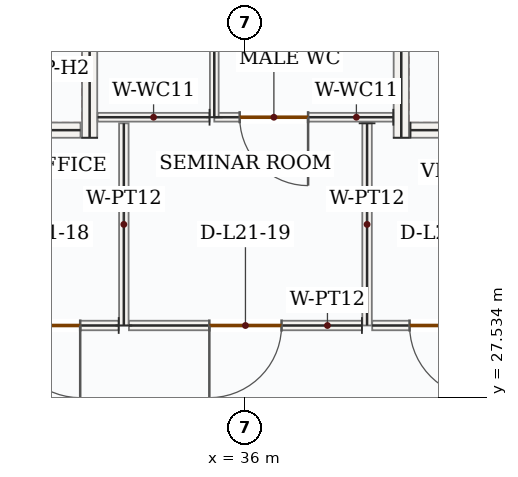
"""IFC4 building model, lengths in metres.
Left out: names, types, materials, properties, quantities, classifications, styles, units other than length and angle.
Written with IfcOpenShell. Run it as: python <this file> out.ifc"""

import sys

from ifc_helpers import new_model, si_unit, direction, frame, frame_2d, origin, place, context, subcontext, project, spatial, rectangle, extrude, source, transform, mapped, element, fill, save


model = new_model("IFC4")
c1 = context("Model", 3, precision=1e-05, world=origin(), true_north=direction((0.0, 1.0)))
c2 = subcontext(c1, "Body", "Model", "MODEL_VIEW")
j1 = project(units=[si_unit("LENGTHUNIT", "METRE"), si_unit("PLANEANGLEUNIT", "RADIAN")], contexts=[c1])
p1 = place(None, origin())
s1 = spatial("IfcSite", under=j1, at=p1, CompositionType="ELEMENT")
p2 = place(p1, origin())
s2 = spatial("IfcBuilding", under=s1, at=p2, CompositionType="ELEMENT")
p3 = place(p2, frame((0.0, 0.0, 96.3)))
s3 = spatial("IfcBuildingStorey", under=s2, at=p3, CompositionType="ELEMENT", Elevation=96.3)
m1 = source(origin(), c2, "Body", "SweptSolid", [
    extrude(rectangle(XDim=2.4, YDim=0.2, at=frame_2d((1.2, 0.0))), origin(), (0.0, 0.0, 1.0), 3.95),
])
p4 = place(p3, frame((33.95, 30.95, 0.0), z_axis=(0.0, 0.0, 1.0), x_axis=(0.0, 1.0, 0.0)))
e1 = element("IfcWall", 1, at=p4, inside=s3, PredefinedType="SOLIDWALL", context=c2, shape_type="MappedRepresentation", body=[
    mapped(m1, transform((0.0, 0.0, 0.0), x_axis=(1.0, 0.0, 0.0), y_axis=(0.0, 1.0, 0.0), z_axis=(0.0, 0.0, 1.0), scale=1.0)),
])
m2 = source(origin(), c2, "Body", "SweptSolid", [
    extrude(rectangle(XDim=2.26, YDim=0.2, at=frame_2d((1.13, 0.0))), origin(), (0.0, 0.0, 1.0), 3.95),
])
p5 = place(p3, frame((31.57, 31.05, 0.0), z_axis=(0.0, 0.0, 1.0), x_axis=(1.0, 0.0, 0.0)))
e2 = element("IfcWall", 2, at=p5, inside=s3, PredefinedType="SOLIDWALL", context=c2, shape_type="MappedRepresentation", body=[
    mapped(m2, transform((0.0, 0.0, 0.0), x_axis=(1.0, 0.0, 0.0), y_axis=(0.0, 1.0, 0.0), z_axis=(0.0, 0.0, 1.0), scale=1.0)),
])
p6 = place(p3, frame((38.05, 30.95, 0.0), z_axis=(0.0, 0.0, 1.0), x_axis=(0.0, 1.0, 0.0)))
e3 = element("IfcWall", 3, at=p6, inside=s3, PredefinedType="SOLIDWALL", context=c2, shape_type="MappedRepresentation", body=[
    mapped(m1, transform((0.0, 0.0, 0.0), x_axis=(1.0, 0.0, 0.0), y_axis=(0.0, 1.0, 0.0), z_axis=(0.0, 0.0, 1.0), scale=1.0)),
])
p7 = place(p3, frame((38.17, 31.05, 0.0), z_axis=(0.0, 0.0, 1.0), x_axis=(1.0, 0.0, 0.0)))
e4 = element("IfcWall", 4, at=p7, inside=s3, PredefinedType="SOLIDWALL", context=c2, shape_type="MappedRepresentation", body=[
    mapped(m2, transform((0.0, 0.0, 0.0), x_axis=(1.0, 0.0, 0.0), y_axis=(0.0, 1.0, 0.0), z_axis=(0.0, 0.0, 1.0), scale=1.0)),
])
p8 = place(p3, frame((37.945, 31.22, 0.0), z_axis=(0.0, 0.0, 1.0), x_axis=(-1.0, 0.0, 0.0)))
e5 = element("IfcWall", 5, at=p8, inside=s3, PredefinedType="PARTITIONING", context=c2, shape_type="SweptSolid", body=[
    extrude(rectangle(XDim=2.355, YDim=0.115, at=frame_2d((1.177, 0.0))), origin(), (0.0, 0.0, 1.0), 3.95),
])
p9 = place(p8, frame((1.121, 0.0, 0.0)))
e6 = element("IfcOpeningElement", 6, at=p9, cuts=e5, PredefinedType="OPENING", context=c2, shape_type="SweptSolid", body=[
    extrude(rectangle(XDim=0.9, YDim=2.1, at=frame_2d((0.45, 1.05))), frame((0.0, 0.067, 0.0), z_axis=(0.0, -1.0, 0.0), x_axis=(1.0, 0.0, 0.0)), (0.0, 0.0, 1.0), 0.135),
])
m3 = source(origin(), c2, "Body", "SweptSolid", [
    extrude(rectangle(XDim=1.96, YDim=0.115, at=frame_2d((0.98, 0.0))), origin(), (0.0, 0.0, 1.0), 3.95),
])
p10 = place(p3, frame((35.59, 31.22, 0.0), z_axis=(0.0, 0.0, 1.0), x_axis=(0.0, 1.0, 0.0)))
e7 = element("IfcWall", 7, at=p10, inside=s3, PredefinedType="PARTITIONING", context=c2, shape_type="MappedRepresentation", body=[
    mapped(m3, transform((0.0, 0.0, 0.0), x_axis=(1.0, 0.0, 0.0), y_axis=(0.0, 1.0, 0.0), z_axis=(0.0, 0.0, 1.0), scale=1.0)),
])
m4 = source(origin(), c2, "Body", "SweptSolid", [
    extrude(rectangle(XDim=1.473, YDim=0.115, at=frame_2d((0.736, 0.0))), origin(), (0.0, 0.0, 1.0), 3.95),
])
p11 = place(p3, frame((35.528, 31.22, 0.0), z_axis=(0.0, 0.0, 1.0), x_axis=(-1.0, 0.0, 0.0)))
e8 = element("IfcWall", 8, at=p11, inside=s3, PredefinedType="PARTITIONING", context=c2, shape_type="MappedRepresentation", body=[
    mapped(m4, transform((0.0, 0.0, 0.0), x_axis=(1.0, 0.0, 0.0), y_axis=(0.0, 1.0, 0.0), z_axis=(0.0, 0.0, 1.0), scale=1.0)),
])
m5 = source(origin(), c2, "Body", "SweptSolid", [
    extrude(rectangle(XDim=2.66, YDim=0.125, at=frame_2d((1.33, 0.0))), origin(), (0.0, 0.0, 1.0), 3.95),
])
for number, where, z_axis, x_axis in (
    (9, (34.4, 28.48, 0.0), (0.0, 0.0, 1.0), (0.0, 1.0, 0.0)),
    (10, (37.6, 31.14, 0.0), (0.0, 0.0, 1.0), (0.0, -1.0, 0.0)),
):
    element("IfcWall", number, at=place(p3, frame(where, z_axis=z_axis, x_axis=x_axis)), inside=s3, PredefinedType="PARTITIONING", context=c2, shape_type="MappedRepresentation", body=[
        mapped(m5, transform((0.0, 0.0, 0.0), x_axis=(1.0, 0.0, 0.0), y_axis=(0.0, 1.0, 0.0), z_axis=(0.0, 0.0, 1.0), scale=1.0)),
    ])
p12 = place(p3, frame((37.532, 28.48, 0.0), z_axis=(0.0, 0.0, 1.0), x_axis=(-1.0, 0.0, 0.0)))
e11 = element("IfcWall", 11, at=p12, inside=s3, PredefinedType="PARTITIONING", context=c2, shape_type="SweptSolid", body=[
    extrude(rectangle(XDim=3.065, YDim=0.125, at=frame_2d((1.532, 0.0))), origin(), (0.0, 0.0, 1.0), 3.95),
])
p13 = place(p12, frame((1.058, 0.0, 0.0)))
e12 = element("IfcOpeningElement", 12, at=p13, cuts=e11, PredefinedType="OPENING", context=c2, shape_type="SweptSolid", body=[
    extrude(rectangle(XDim=0.95, YDim=2.15, at=frame_2d((0.475, 1.075))), frame((0.0, 0.073, 0.0), z_axis=(0.0, -1.0, 0.0), x_axis=(1.0, 0.0, 0.0)), (0.0, 0.0, 1.0), 0.145),
])
p14 = place(p3, frame((34.333, 28.48, 0.0), z_axis=(0.0, 0.0, 1.0), x_axis=(-1.0, 0.0, 0.0)))
e13 = element("IfcWall", 13, at=p14, inside=s3, PredefinedType="PARTITIONING", context=c2, shape_type="SweptSolid", body=[
    extrude(rectangle(XDim=3.252, YDim=0.125, at=frame_2d((1.626, 0.0))), origin(), (0.0, 0.0, 1.0), 3.95),
])
p15 = place(p14, frame((0.507, 0.0, 0.0)))
e14 = element("IfcOpeningElement", 14, at=p15, cuts=e13, PredefinedType="OPENING", context=c2, shape_type="SweptSolid", body=[
    extrude(rectangle(XDim=0.95, YDim=2.15, at=frame_2d((0.475, 1.075))), frame((0.0, 0.073, 0.0), z_axis=(0.0, -1.0, 0.0), x_axis=(1.0, 0.0, 0.0)), (0.0, 0.0, 1.0), 0.145),
])
p16 = place(p3, frame((40.853, 28.48, 0.0), z_axis=(0.0, 0.0, 1.0), x_axis=(-1.0, 0.0, 0.0)))
e15 = element("IfcWall", 15, at=p16, inside=s3, PredefinedType="PARTITIONING", context=c2, shape_type="SweptSolid", body=[
    extrude(rectangle(XDim=3.185, YDim=0.125, at=frame_2d((1.593, 0.0))), origin(), (0.0, 0.0, 1.0), 3.95),
])
p17 = place(p16, frame((1.743, 0.0, 0.0)))
e16 = element("IfcOpeningElement", 16, at=p17, cuts=e15, PredefinedType="OPENING", context=c2, shape_type="SweptSolid", body=[
    extrude(rectangle(XDim=0.95, YDim=2.15, at=frame_2d((0.475, 1.075))), frame((0.0, 0.073, 0.0), z_axis=(0.0, -1.0, 0.0), x_axis=(1.0, 0.0, 0.0)), (0.0, 0.0, 1.0), 0.145),
])
m6 = source(origin(), c2, "Body", "SweptSolid", [
    extrude(rectangle(XDim=0.95, YDim=2.15, at=frame_2d((0.475, 1.075))), frame((0.0, 0.025, 0.0), z_axis=(0.0, -1.0, 0.0), x_axis=(1.0, 0.0, 0.0)), (0.0, 0.0, 1.0), 0.05),
])
p18 = place(p15, origin())
e17 = element("IfcDoor", 17, at=p18, inside=s3, OperationType="SINGLE_SWING_LEFT", PredefinedType="DOOR", context=c2, shape_type="MappedRepresentation", body=[
    mapped(m6, transform((0.0, 0.0, 0.0), x_axis=(1.0, 0.0, 0.0), y_axis=(0.0, 1.0, 0.0), z_axis=(0.0, 0.0, 1.0), scale=1.0)),
])
fill(e14, e17)
p19 = place(p13, origin())
e18 = element("IfcDoor", 18, at=p19, inside=s3, OperationType="SINGLE_SWING_RIGHT", PredefinedType="DOOR", context=c2, shape_type="MappedRepresentation", body=[
    mapped(m6, transform((0.0, 0.0, 0.0), x_axis=(1.0, 0.0, 0.0), y_axis=(0.0, 1.0, 0.0), z_axis=(0.0, 0.0, 1.0), scale=1.0)),
])
fill(e12, e18)
p20 = place(p17, origin())
e19 = element("IfcDoor", 19, at=p20, inside=s3, OperationType="SINGLE_SWING_LEFT", PredefinedType="DOOR", context=c2, shape_type="MappedRepresentation", body=[
    mapped(m6, transform((0.0, 0.0, 0.0), x_axis=(1.0, 0.0, 0.0), y_axis=(0.0, 1.0, 0.0), z_axis=(0.0, 0.0, 1.0), scale=1.0)),
])
fill(e16, e19)
m7 = source(origin(), c2, "Body", "SweptSolid", [
    extrude(rectangle(XDim=0.9, YDim=2.1, at=frame_2d((0.45, 1.05))), frame((0.0, 0.025, 0.0), z_axis=(0.0, -1.0, 0.0), x_axis=(1.0, 0.0, 0.0)), (0.0, 0.0, 1.0), 0.05),
])
p21 = place(p9, origin())
e20 = element("IfcDoor", 20, at=p21, inside=s3, OperationType="SINGLE_SWING_LEFT", PredefinedType="DOOR", context=c2, shape_type="MappedRepresentation", body=[
    mapped(m7, transform((0.0, 0.0, 0.0), x_axis=(1.0, 0.0, 0.0), y_axis=(0.0, 1.0, 0.0), z_axis=(0.0, 0.0, 1.0), scale=1.0)),
])
fill(e6, e20)
save(model, sys.argv[1])
